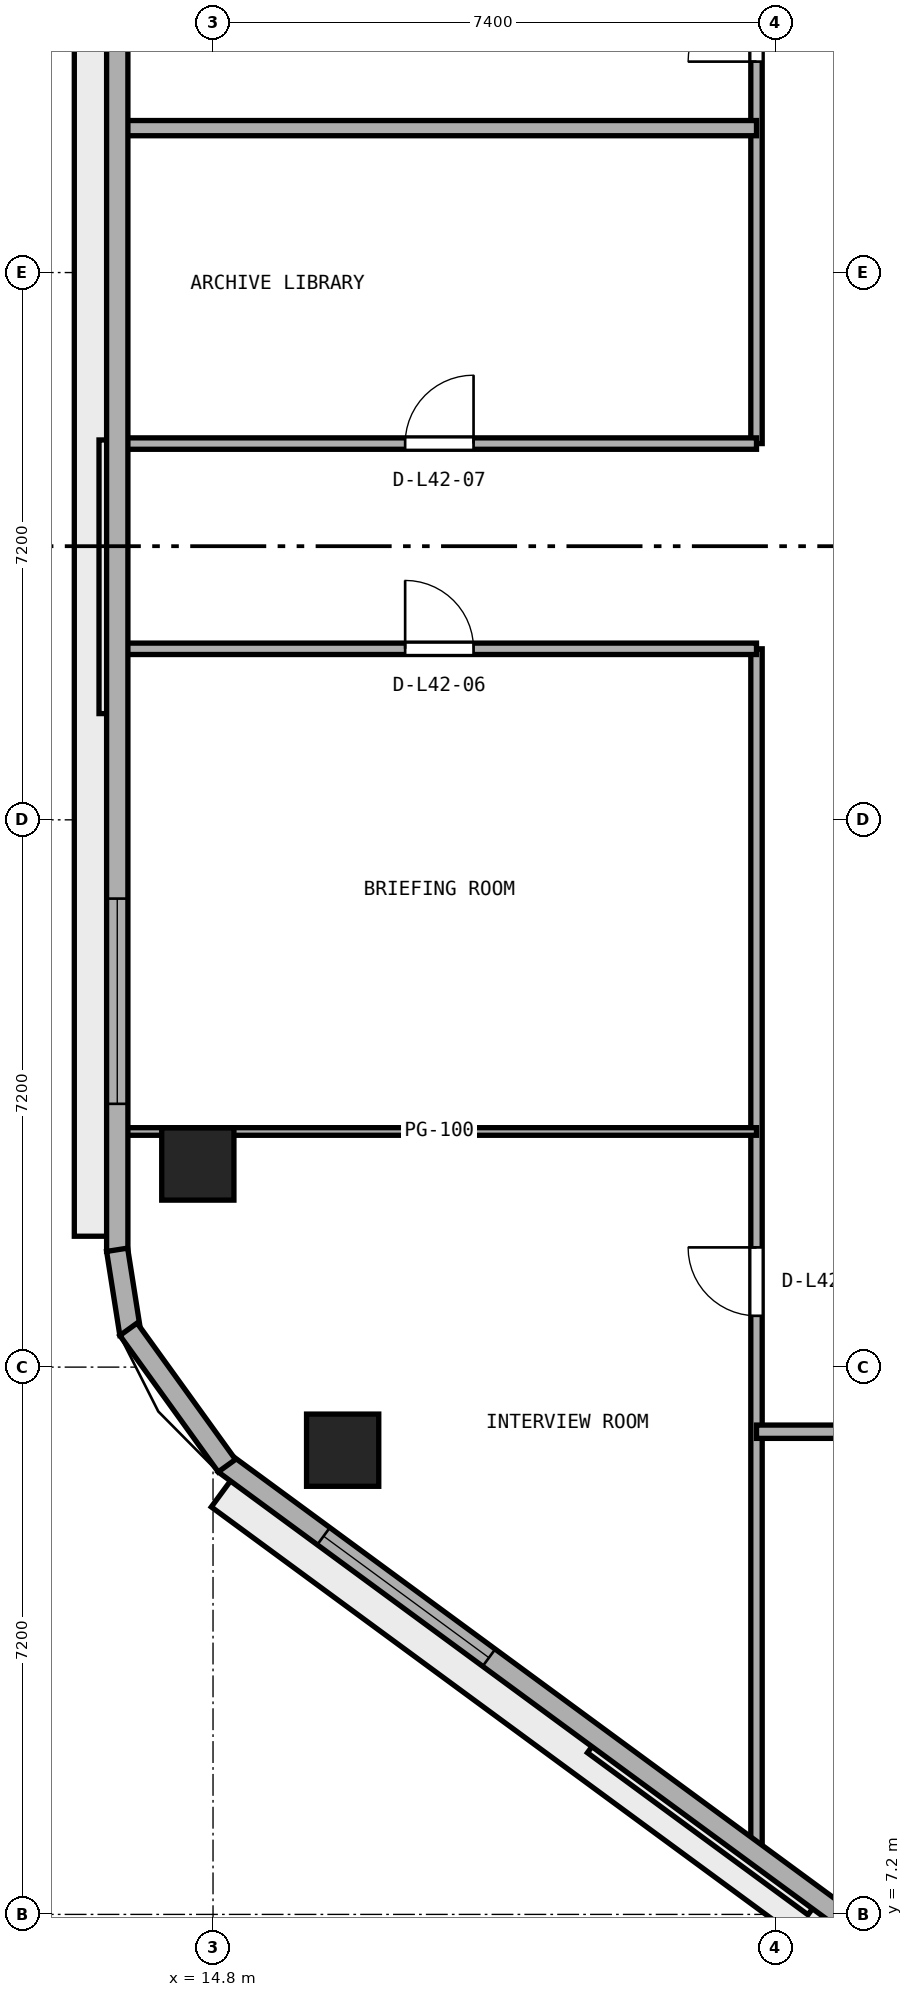
"""IFC4 building model, lengths in metres.
Left out: names, types, materials, properties, quantities, classifications, styles, units other than length and angle.
Written with IfcOpenShell. Run it as: python <this file> out.ifc"""

import sys

from ifc_helpers import new_model, si_unit, direction, frame, frame_2d, origin, origin_2d, place, context, subcontext, project, spatial, rectangle, extrude, element, fill, save


model = new_model("IFC4")
c1 = context("Model", 3, precision=1e-05, world=origin(), true_north=direction((0.0, 1.0)))
c2 = subcontext(c1, "Body", "Model", "MODEL_VIEW")
j1 = project(units=[si_unit("LENGTHUNIT", "METRE"), si_unit("PLANEANGLEUNIT", "RADIAN")], contexts=[c1])
p1 = place(None, origin())
s1 = spatial("IfcSite", under=j1, at=p1, CompositionType="ELEMENT")
p2 = place(p1, origin())
s2 = spatial("IfcBuilding", under=s1, at=p2, CompositionType="ELEMENT")
p3 = place(p2, frame((0.0, 0.0, 166.8)))
s3 = spatial("IfcBuildingStorey", under=s2, at=p3, CompositionType="ELEMENT", Elevation=166.8)
for number, where, z_axis, x_axis in (
    (1, (14.6, 17.072, 0.0), (0.0, 0.0, 1.0), (1.0, 0.0, 0.0)),
    (2, (16.505, 13.307, 0.0), (0.0, 0.0, 1.0), (1.0, 0.0, 0.0)),
):
    element("IfcColumn", number, at=place(p3, frame(where, z_axis=z_axis, x_axis=x_axis)), inside=s3, PredefinedType="COLUMN", context=c2, shape_type="SweptSolid", body=[
        extrude(rectangle(XDim=0.95, YDim=0.95, at=origin_2d()), origin(), (0.0, 0.0, 1.0), 3.8),
    ])
p4 = place(p3, frame((21.95, 7.957, 0.0), z_axis=(0.0, 0.0, 1.0), x_axis=(0.0, 1.0, 0.0)))
e3 = element("IfcWall", 3, at=p4, inside=s3, PredefinedType="PARTITIONING", context=c2, shape_type="SweptSolid", body=[
    extrude(rectangle(XDim=15.894, YDim=0.15, at=frame_2d((7.947, 0.0))), origin(), (0.0, 0.0, 1.0), 3.54),
])
p5 = place(p4, frame((7.118, 0.0, 0.0)))
e4 = element("IfcOpeningElement", 4, at=p5, cuts=e3, PredefinedType="OPENING", context=c2, shape_type="SweptSolid", body=[
    extrude(rectangle(XDim=0.9, YDim=2.1, at=frame_2d((0.45, 1.05))), frame((0.0, 0.085, 0.0), z_axis=(0.0, -1.0, 0.0), x_axis=(1.0, 0.0, 0.0)), (0.0, 0.0, 1.0), 0.17),
])
p6 = place(p3, frame((21.95, 26.55, 0.0), z_axis=(0.0, 0.0, 1.0), x_axis=(0.0, 1.0, 0.0)))
e5 = element("IfcWall", 5, at=p6, inside=s3, PredefinedType="PARTITIONING", context=c2, shape_type="SweptSolid", body=[
    extrude(rectangle(XDim=10.3, YDim=0.15, at=frame_2d((5.15, 0.0))), origin(), (0.0, 0.0, 1.0), 3.54),
])
p7 = place(p6, frame((5.025, 0.0, 0.0)))
e6 = element("IfcOpeningElement", 6, at=p7, cuts=e5, PredefinedType="OPENING", context=c2, shape_type="SweptSolid", body=[
    extrude(rectangle(XDim=0.9, YDim=2.1, at=frame_2d((0.45, 1.05))), frame((0.0, 0.085, 0.0), z_axis=(0.0, -1.0, 0.0), x_axis=(1.0, 0.0, 0.0)), (0.0, 0.0, 1.0), 0.17),
])
p8 = place(p3, frame((21.95, 13.55, 0.0), z_axis=(0.0, 0.0, 1.0), x_axis=(1.0, 0.0, 0.0)))
e7 = element("IfcWall", 7, at=p8, inside=s3, PredefinedType="PARTITIONING", context=c2, shape_type="SweptSolid", body=[
    extrude(rectangle(XDim=30.1, YDim=0.175, at=frame_2d((15.05, 0.0))), origin(), (0.0, 0.0, 1.0), 3.54),
])
p9 = place(p8, frame((10.645, 0.0, 0.0)))
e8 = element("IfcOpeningElement", 8, at=p9, cuts=e7, PredefinedType="OPENING", context=c2, shape_type="SweptSolid", body=[
    extrude(rectangle(XDim=0.9, YDim=2.1, at=frame_2d((0.45, 1.05))), frame((0.0, 0.097, 0.0), z_axis=(0.0, -1.0, 0.0), x_axis=(1.0, 0.0, 0.0)), (0.0, 0.0, 1.0), 0.195),
])
p10 = place(p8, frame((25.455, 0.0, 0.0)))
e9 = element("IfcOpeningElement", 9, at=p10, cuts=e7, PredefinedType="OPENING", context=c2, shape_type="SweptSolid", body=[
    extrude(rectangle(XDim=0.9, YDim=2.1, at=frame_2d((0.45, 1.05))), frame((0.0, 0.097, 0.0), z_axis=(0.0, -1.0, 0.0), x_axis=(1.0, 0.0, 0.0)), (0.0, 0.0, 1.0), 0.195),
])
p11 = place(p3, frame((13.605, 17.5, 0.0), z_axis=(0.0, 0.0, 1.0), x_axis=(1.0, 0.0, 0.0)))
e10 = element("IfcWall", 10, at=p11, inside=s3, PredefinedType="PARTITIONING", context=c2, shape_type="SweptSolid", body=[
    extrude(rectangle(XDim=8.345, YDim=0.1, at=frame_2d((4.172, 0.0))), origin(), (0.0, 0.0, 1.0), 2.923),
])
p12 = place(p3, frame((13.605, 23.85, 0.0), z_axis=(0.0, 0.0, 1.0), x_axis=(1.0, 0.0, 0.0)))
e11 = element("IfcWall", 11, at=p12, inside=s3, PredefinedType="PARTITIONING", context=c2, shape_type="SweptSolid", body=[
    extrude(rectangle(XDim=8.345, YDim=0.15, at=frame_2d((4.172, 0.0))), origin(), (0.0, 0.0, 1.0), 3.54),
])
p13 = place(p12, frame((3.722, 0.0, 0.0)))
e12 = element("IfcOpeningElement", 12, at=p13, cuts=e11, PredefinedType="OPENING", context=c2, shape_type="SweptSolid", body=[
    extrude(rectangle(XDim=0.9, YDim=2.1, at=frame_2d((0.45, 1.05))), frame((0.0, 0.085, 0.0), z_axis=(0.0, -1.0, 0.0), x_axis=(1.0, 0.0, 0.0)), (0.0, 0.0, 1.0), 0.17),
])
p14 = place(p3, frame((13.605, 26.55, 0.0), z_axis=(0.0, 0.0, 1.0), x_axis=(1.0, 0.0, 0.0)))
e13 = element("IfcWall", 13, at=p14, inside=s3, PredefinedType="PARTITIONING", context=c2, shape_type="SweptSolid", body=[
    extrude(rectangle(XDim=8.345, YDim=0.15, at=frame_2d((4.172, 0.0))), origin(), (0.0, 0.0, 1.0), 3.54),
])
p15 = place(p14, frame((3.722, 0.0, 0.0)))
e14 = element("IfcOpeningElement", 14, at=p15, cuts=e13, PredefinedType="OPENING", context=c2, shape_type="SweptSolid", body=[
    extrude(rectangle(XDim=0.9, YDim=2.1, at=frame_2d((0.45, 1.05))), frame((0.0, 0.085, 0.0), z_axis=(0.0, -1.0, 0.0), x_axis=(1.0, 0.0, 0.0)), (0.0, 0.0, 1.0), 0.17),
])
p16 = place(p3, frame((13.605, 30.7, 0.0), z_axis=(0.0, 0.0, 1.0), x_axis=(1.0, 0.0, 0.0)))
e15 = element("IfcWall", 15, at=p16, inside=s3, PredefinedType="PARTITIONING", context=c2, shape_type="SweptSolid", body=[
    extrude(rectangle(XDim=8.345, YDim=0.2, at=frame_2d((4.172, 0.0))), origin(), (0.0, 0.0, 1.0), 3.54),
])
p17 = place(p3, frame((13.54, 33.673, 0.0), z_axis=(0.0, 0.0, 1.0), x_axis=(0.0, -1.0, 0.0)))
e16 = element("IfcWall", 16, at=p17, inside=s3, PredefinedType="STANDARD", context=c2, shape_type="SweptSolid", body=[
    extrude(rectangle(XDim=17.751, YDim=0.28, at=frame_2d((8.875, 0.0))), origin(), (0.0, 0.0, 1.0), 3.54),
])
p18 = place(p17, frame((13.109, 0.0, 0.9)))
e17 = element("IfcOpeningElement", 17, at=p18, cuts=e16, PredefinedType="OPENING", context=c2, shape_type="SweptSolid", body=[
    extrude(rectangle(XDim=2.7, YDim=1.75, at=frame_2d((1.35, 0.875))), frame((0.0, 0.15, 0.0), z_axis=(0.0, -1.0, 0.0), x_axis=(1.0, 0.0, 0.0)), (0.0, 0.0, 1.0), 0.3),
])
p19 = place(p3, frame((14.951, 13.134, 0.0), z_axis=(0.0, 0.0, 1.0), x_axis=(0.805804940328, -0.592181051827, 0.0)))
e18 = element("IfcWall", 18, at=p19, inside=s3, PredefinedType="STANDARD", context=c2, shape_type="SweptSolid", body=[
    extrude(rectangle(XDim=15.804, YDim=0.28, at=frame_2d((7.902, 0.0))), origin(), (0.0, 0.0, 1.0), 3.54),
])
p20 = place(p19, frame((1.617, 0.0, 0.9)))
e19 = element("IfcOpeningElement", 19, at=p20, cuts=e18, PredefinedType="OPENING", context=c2, shape_type="SweptSolid", body=[
    extrude(rectangle(XDim=2.7, YDim=1.75, at=frame_2d((1.35, 0.875))), frame((0.0, 0.15, 0.0), z_axis=(0.0, -1.0, 0.0), x_axis=(1.0, 0.0, 0.0)), (0.0, 0.0, 1.0), 0.3),
])
p21 = place(p19, frame((11.487, 0.0, 0.9)))
e20 = element("IfcOpeningElement", 20, at=p21, cuts=e18, PredefinedType="OPENING", context=c2, shape_type="SweptSolid", body=[
    extrude(rectangle(XDim=2.7, YDim=1.75, at=frame_2d((1.35, 0.875))), frame((0.0, 0.15, 0.0), z_axis=(0.0, -1.0, 0.0), x_axis=(1.0, 0.0, 0.0)), (0.0, 0.0, 1.0), 0.3),
])
p22 = place(p3, frame((13.538, 15.944, 0.0), z_axis=(0.0, 0.0, 1.0), x_axis=(0.155447556013, -0.987844146275, 0.0)))
e21 = element("IfcWall", 21, at=p22, inside=s3, PredefinedType="STANDARD", context=c2, shape_type="SweptSolid", body=[
    extrude(rectangle(XDim=1.12, YDim=0.28, at=frame_2d((0.56, 0.0))), origin(), (0.0, 0.0, 1.0), 3.54),
])
p23 = place(p3, frame((13.688, 14.898, 0.0), z_axis=(0.0, 0.0, 1.0), x_axis=(0.584833657716, -0.811153248655, 0.0)))
e22 = element("IfcWall", 22, at=p23, inside=s3, PredefinedType="STANDARD", context=c2, shape_type="SweptSolid", body=[
    extrude(rectangle(XDim=2.212, YDim=0.28, at=frame_2d((1.106, 0.0))), origin(), (0.0, 0.0, 1.0), 3.54),
])
p24 = place(p5, origin())
e23 = element("IfcDoor", 23, at=p24, inside=s3, OperationType="SINGLE_SWING_RIGHT", PredefinedType="DOOR", context=c2, shape_type="SweptSolid", body=[
    extrude(rectangle(XDim=0.9, YDim=2.1, at=frame_2d((0.45, 1.05))), frame((0.0, 0.025, 0.0), z_axis=(0.0, -1.0, 0.0), x_axis=(1.0, 0.0, 0.0)), (0.0, 0.0, 1.0), 0.05),
])
fill(e4, e23)
p25 = place(p13, origin())
e24 = element("IfcDoor", 24, at=p25, inside=s3, OperationType="SINGLE_SWING_LEFT", PredefinedType="DOOR", context=c2, shape_type="SweptSolid", body=[
    extrude(rectangle(XDim=0.9, YDim=2.1, at=frame_2d((0.45, 1.05))), frame((0.0, 0.025, 0.0), z_axis=(0.0, -1.0, 0.0), x_axis=(1.0, 0.0, 0.0)), (0.0, 0.0, 1.0), 0.05),
])
fill(e12, e24)
p26 = place(p15, origin())
e25 = element("IfcDoor", 25, at=p26, inside=s3, OperationType="SINGLE_SWING_RIGHT", PredefinedType="DOOR", context=c2, shape_type="SweptSolid", body=[
    extrude(rectangle(XDim=0.9, YDim=2.1, at=frame_2d((0.45, 1.05))), frame((0.0, 0.025, 0.0), z_axis=(0.0, -1.0, 0.0), x_axis=(1.0, 0.0, 0.0)), (0.0, 0.0, 1.0), 0.05),
])
fill(e14, e25)
p27 = place(p7, origin())
e26 = element("IfcDoor", 26, at=p27, inside=s3, OperationType="SINGLE_SWING_LEFT", PredefinedType="DOOR", context=c2, shape_type="SweptSolid", body=[
    extrude(rectangle(XDim=0.9, YDim=2.1, at=frame_2d((0.45, 1.05))), frame((0.0, 0.025, 0.0), z_axis=(0.0, -1.0, 0.0), x_axis=(1.0, 0.0, 0.0)), (0.0, 0.0, 1.0), 0.05),
])
fill(e6, e26)
p28 = place(p18, origin())
e27 = element("IfcWindow", 27, at=p28, inside=s3, PartitioningType="SINGLE_PANEL", PredefinedType="WINDOW", context=c2, shape_type="SweptSolid", body=[
    extrude(rectangle(XDim=2.7, YDim=1.75, at=frame_2d((1.35, 0.875))), frame((0.0, 0.03, 0.0), z_axis=(0.0, -1.0, 0.0), x_axis=(1.0, 0.0, 0.0)), (0.0, 0.0, 1.0), 0.06),
])
fill(e17, e27)
p29 = place(p20, origin())
e28 = element("IfcWindow", 28, at=p29, inside=s3, PartitioningType="SINGLE_PANEL", PredefinedType="WINDOW", context=c2, shape_type="SweptSolid", body=[
    extrude(rectangle(XDim=2.7, YDim=1.75, at=frame_2d((1.35, 0.875))), frame((0.0, 0.03, 0.0), z_axis=(0.0, -1.0, 0.0), x_axis=(1.0, 0.0, 0.0)), (0.0, 0.0, 1.0), 0.06),
])
fill(e19, e28)
save(model, sys.argv[1])
